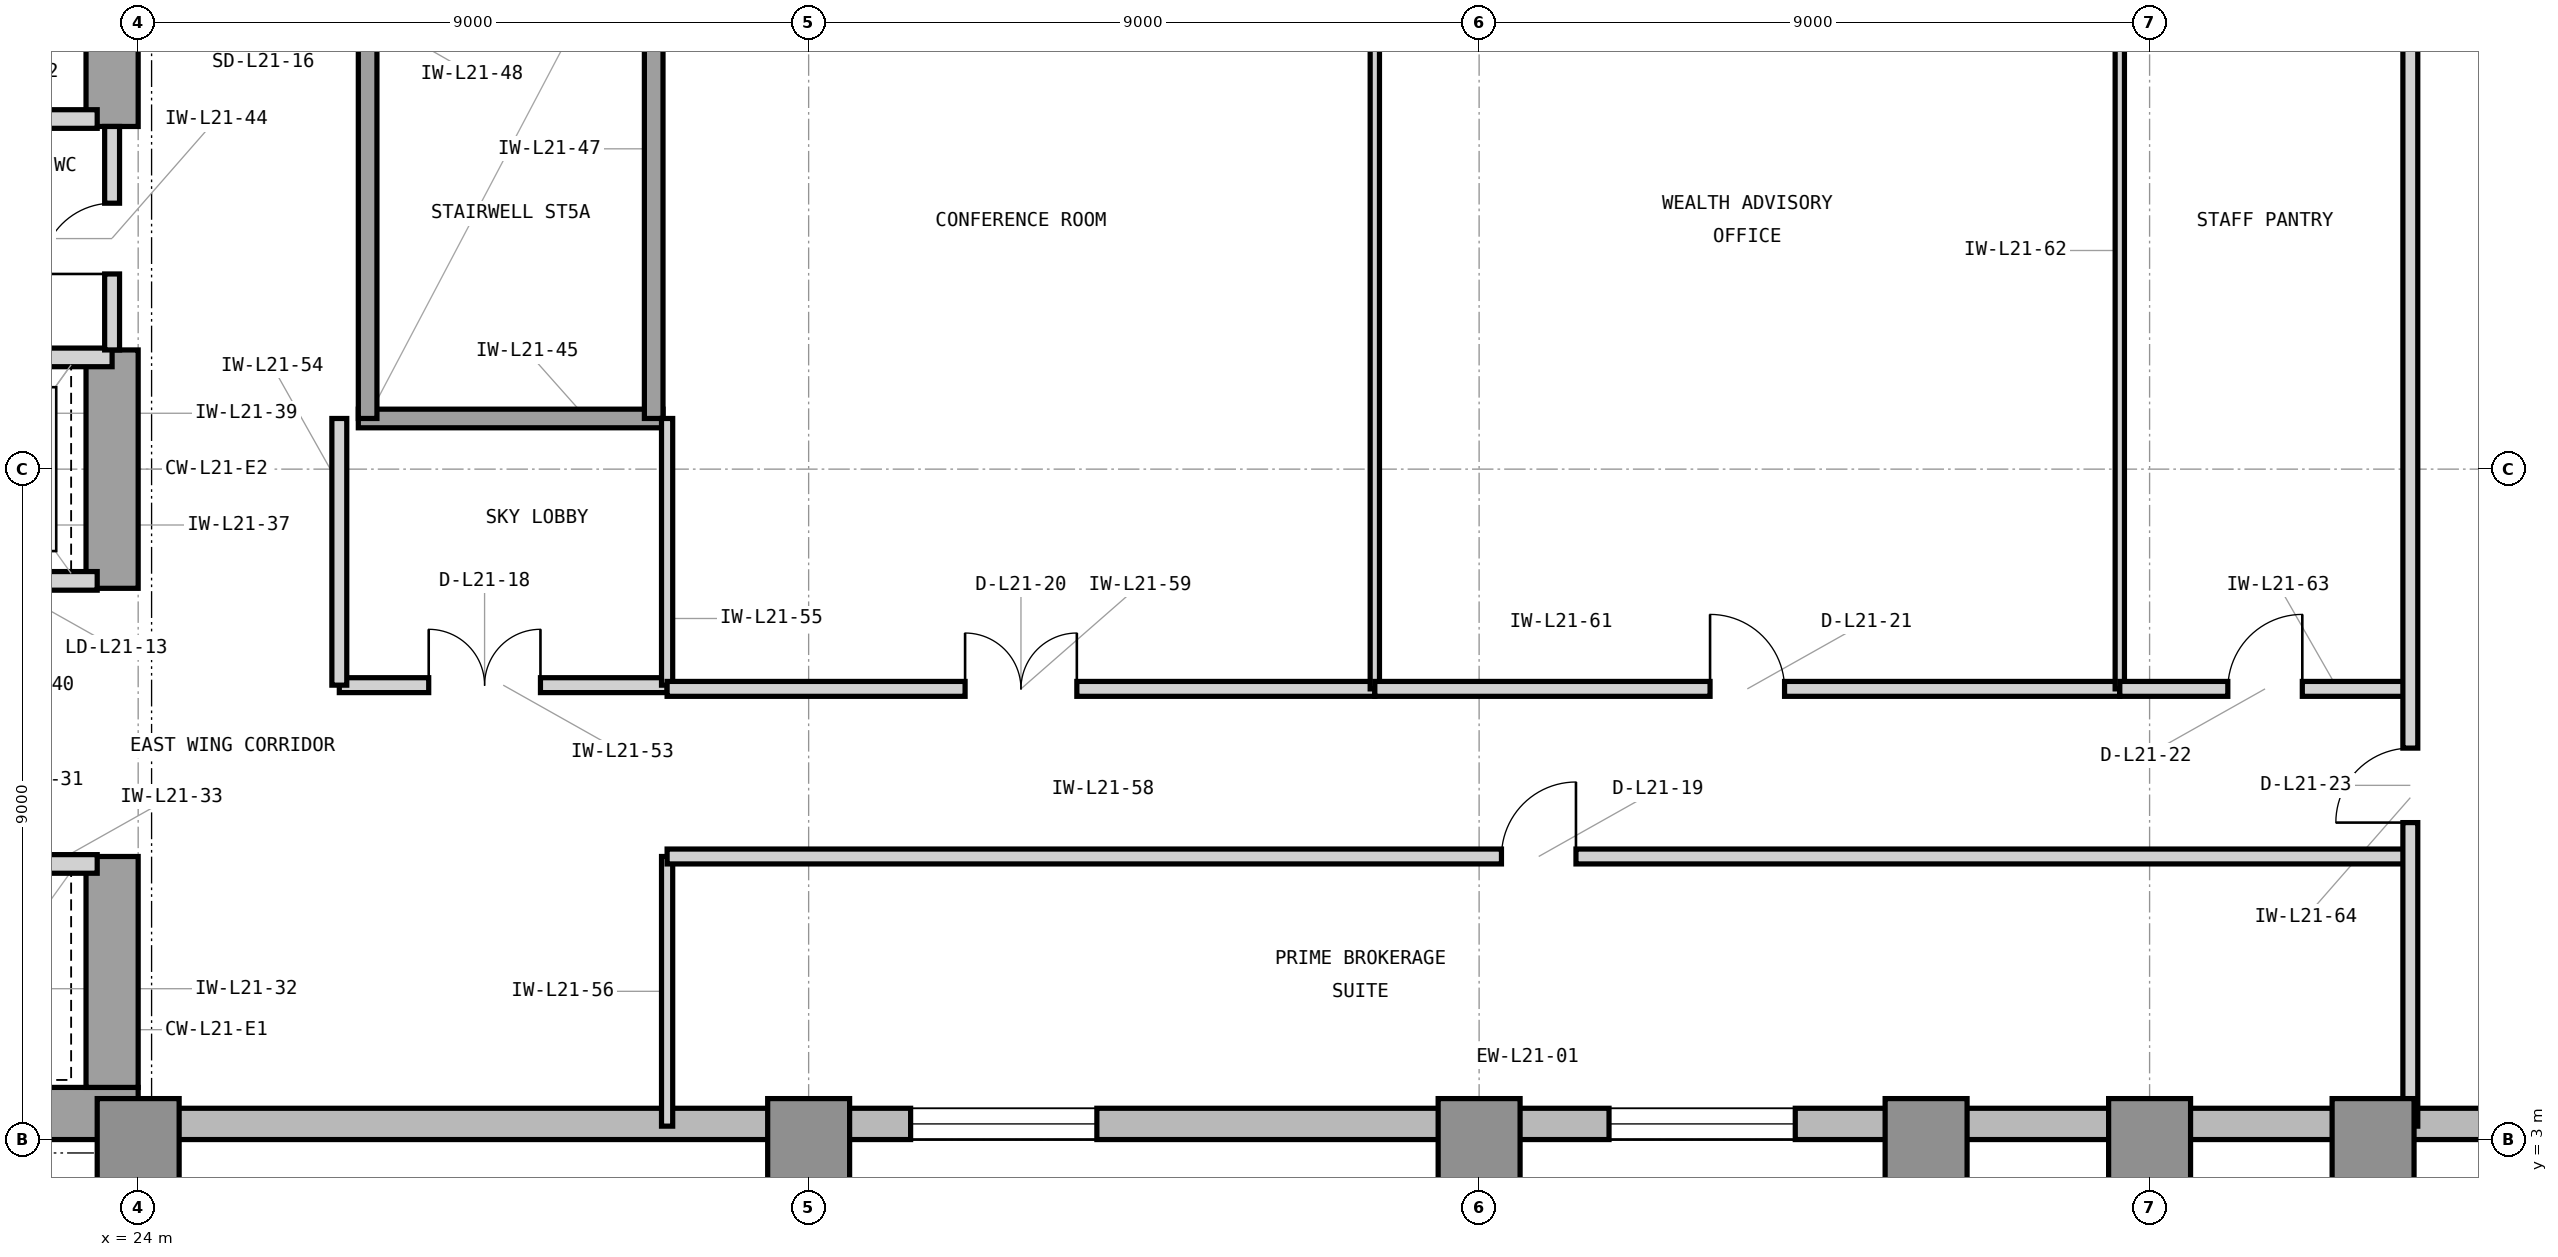
"""IFC4 building model, lengths in metres.
Left out: names, types, materials, properties, quantities, classifications, styles, units other than length and angle.
Written with IfcOpenShell. Run it as: python <this file> out.ifc"""

import sys

from ifc_helpers import new_model, si_unit, direction, frame, frame_2d, origin, origin_2d, place, context, subcontext, project, spatial, rectangle, extrude, element, fill, save


model = new_model("IFC4")
c1 = context("Model", 3, precision=1e-05, world=origin(), true_north=direction((0.0, 1.0)))
c2 = subcontext(c1, "Body", "Model", "MODEL_VIEW")
j1 = project(units=[si_unit("LENGTHUNIT", "METRE"), si_unit("PLANEANGLEUNIT", "RADIAN")], contexts=[c1])
p1 = place(None, origin())
s1 = spatial("IfcSite", under=j1, at=p1, CompositionType="ELEMENT")
p2 = place(p1, origin())
s2 = spatial("IfcBuilding", under=s1, at=p2, CompositionType="ELEMENT")
p3 = place(p2, frame((0.0, 0.0, 93.3)))
s3 = spatial("IfcBuildingStorey", under=s2, at=p3, CompositionType="ELEMENT", Elevation=93.3)
p4 = place(p3, frame((7.475, 3.35, 0.0), z_axis=(0.0, 0.0, 1.0), x_axis=(1.0, 0.0, 0.0)))
e1 = element("IfcWall", 1, at=p4, inside=s3, PredefinedType="SHEAR", context=c2, shape_type="SweptSolid", body=[
    extrude(rectangle(XDim=16.525, YDim=0.7, at=frame_2d((8.262, 0.0))), origin(), (0.0, 0.0, 1.0), 3.9),
])
p5 = place(p3, frame((23.65, 3.7, 0.0), z_axis=(0.0, 0.0, 1.0), x_axis=(0.0, 1.0, 0.0)))
e2 = element("IfcWall", 2, at=p5, inside=s3, PredefinedType="SHEAR", context=c2, shape_type="SweptSolid", body=[
    extrude(rectangle(XDim=3.1, YDim=0.7, at=frame_2d((1.55, 0.0))), origin(), (0.0, 0.0, 1.0), 3.9),
])
p6 = place(p3, frame((23.65, 10.4, 0.0), z_axis=(0.0, 0.0, 1.0), x_axis=(0.0, 1.0, 0.0)))
e3 = element("IfcWall", 3, at=p6, inside=s3, PredefinedType="SHEAR", context=c2, shape_type="SweptSolid", body=[
    extrude(rectangle(XDim=3.2, YDim=0.7, at=frame_2d((1.6, 0.0))), origin(), (0.0, 0.0, 1.0), 3.9),
])
p7 = place(p3, frame((23.65, 16.6, 0.0), z_axis=(0.0, 0.0, 1.0), x_axis=(0.0, 1.0, 0.0)))
e4 = element("IfcWall", 4, at=p7, inside=s3, PredefinedType="SHEAR", context=c2, shape_type="SweptSolid", body=[
    extrude(rectangle(XDim=4.05, YDim=0.7, at=frame_2d((2.025, 0.0))), origin(), (0.0, 0.0, 1.0), 3.9),
])
for number, where, z_axis, x_axis in (
    (5, (24.0, 3.0, 0.0), (0.0, 0.0, 1.0), (1.0, 0.0, 0.0)),
    (6, (33.0, 3.0, 0.0), (0.0, 0.0, 1.0), (1.0, 0.0, 0.0)),
    (7, (42.0, 3.0, 0.0), (0.0, 0.0, 1.0), (1.0, 0.0, 0.0)),
    (8, (48.0, 3.0, 0.0), (0.0, 0.0, 1.0), (1.0, 0.0, 0.0)),
    (9, (51.0, 3.0, 0.0), (0.0, 0.0, 1.0), (1.0, 0.0, 0.0)),
    (10, (54.0, 3.0, 0.0), (0.0, 0.0, 1.0), (1.0, 0.0, 0.0)),
):
    element("IfcColumn", number, at=place(p3, frame(where, z_axis=z_axis, x_axis=x_axis)), inside=s3, PredefinedType="COLUMN", context=c2, shape_type="SweptSolid", body=[
        extrude(rectangle(XDim=1.1, YDim=1.1, at=origin_2d()), origin(), (0.0, 0.0, 1.0), 3.9),
    ])
p8 = place(p3, frame((23.9, 3.21, 0.0), z_axis=(0.0, 0.0, 1.0), x_axis=(1.0, 0.0, 0.0)))
e11 = element("IfcWall", 11, at=p8, inside=s3, PredefinedType="STANDARD", context=c2, shape_type="SweptSolid", body=[
    extrude(rectangle(XDim=37.5, YDim=0.42, at=frame_2d((18.75, 0.0))), origin(), (0.0, 0.0, 1.0), 3.7),
])
p9 = place(p8, frame((10.469, 0.0, 0.85)))
e12 = element("IfcOpeningElement", 12, at=p9, cuts=e11, PredefinedType="OPENING", context=c2, shape_type="SweptSolid", body=[
    extrude(rectangle(XDim=2.5, YDim=2.25, at=frame_2d((1.25, 1.125))), frame((0.0, 0.22, 0.0), z_axis=(0.0, -1.0, 0.0), x_axis=(1.0, 0.0, 0.0)), (0.0, 0.0, 1.0), 0.44),
])
p10 = place(p8, frame((19.844, 0.0, 0.85)))
e13 = element("IfcOpeningElement", 13, at=p10, cuts=e11, PredefinedType="OPENING", context=c2, shape_type="SweptSolid", body=[
    extrude(rectangle(XDim=2.5, YDim=2.25, at=frame_2d((1.25, 1.125))), frame((0.0, 0.22, 0.0), z_axis=(0.0, -1.0, 0.0), x_axis=(1.0, 0.0, 0.0)), (0.0, 0.0, 1.0), 0.44),
])
for number, where, z_axis, x_axis in (
    (14, (21.05, 16.7, 0.0), (0.0, 0.0, 1.0), (1.0, 0.0, 0.0)),
    (15, (21.05, 6.7, 0.0), (0.0, 0.0, 1.0), (1.0, 0.0, 0.0)),
):
    element("IfcWall", number, at=place(p3, frame(where, z_axis=z_axis, x_axis=x_axis)), inside=s3, PredefinedType="PARTITIONING", context=c2, shape_type="SweptSolid", body=[
        extrude(rectangle(XDim=2.4, YDim=0.25, at=frame_2d((1.2, 0.0))), origin(), (0.0, 0.0, 1.0), 3.227),
    ])
p11 = place(p3, frame((21.05, 10.5, 0.0), z_axis=(0.0, 0.0, 1.0), x_axis=(1.0, 0.0, 0.0)))
e16 = element("IfcWall", 16, at=p11, inside=s3, PredefinedType="PARTITIONING", context=c2, shape_type="SweptSolid", body=[
    extrude(rectangle(XDim=2.4, YDim=0.25, at=frame_2d((1.2, 0.0))), origin(), (0.0, 0.0, 1.0), 3.227),
])
p12 = place(p11, frame((0.48, 0.0, 0.0)))
e17 = element("IfcOpeningElement", 17, at=p12, cuts=e16, PredefinedType="OPENING", context=c2, shape_type="SweptSolid", body=[
    extrude(rectangle(XDim=1.15, YDim=2.25, at=frame_2d((0.575, 1.125))), frame((0.0, 0.135, 0.0), z_axis=(0.0, -1.0, 0.0), x_axis=(1.0, 0.0, 0.0)), (0.0, 0.0, 1.0), 0.27),
])
p13 = place(p3, frame((14.7, 13.5, 0.0), z_axis=(0.0, 0.0, 1.0), x_axis=(1.0, 0.0, 0.0)))
e18 = element("IfcWall", 18, at=p13, inside=s3, PredefinedType="PARTITIONING", context=c2, shape_type="SweptSolid", body=[
    extrude(rectangle(XDim=8.95, YDim=0.25, at=frame_2d((4.475, 0.0))), origin(), (0.0, 0.0, 1.0), 3.227),
])
p14 = place(p3, frame((23.65, 13.6, 0.0), z_axis=(0.0, 0.0, 1.0), x_axis=(0.0, 1.0, 0.0)))
e19 = element("IfcWall", 19, at=p14, inside=s3, PredefinedType="PARTITIONING", context=c2, shape_type="SweptSolid", body=[
    extrude(rectangle(XDim=3.0, YDim=0.2, at=frame_2d((1.5, 0.0))), origin(), (0.0, 0.0, 1.0), 3.69),
])
p15 = place(p14, frame((1.02, 0.0, 0.0)))
e20 = element("IfcOpeningElement", 20, at=p15, cuts=e19, PredefinedType="OPENING", context=c2, shape_type="SweptSolid", body=[
    extrude(rectangle(XDim=0.95, YDim=2.1, at=frame_2d((0.475, 1.05))), frame((0.0, 0.11, 0.0), z_axis=(0.0, -1.0, 0.0), x_axis=(1.0, 0.0, 0.0)), (0.0, 0.0, 1.0), 0.22),
])
p16 = place(p3, frame((26.955, 12.68, 0.0), z_axis=(0.0, 0.0, 1.0), x_axis=(1.0, 0.0, 0.0)))
e21 = element("IfcWall", 21, at=p16, inside=s3, PredefinedType="SHEAR", context=c2, shape_type="SweptSolid", body=[
    extrude(rectangle(XDim=4.09, YDim=0.25, at=frame_2d((2.045, 0.0))), origin(), (0.0, 0.0, 1.0), 3.9),
])
p17 = place(p3, frame((30.92, 12.68, 0.0), z_axis=(0.0, 0.0, 1.0), x_axis=(0.0, 1.0, 0.0)))
e22 = element("IfcWall", 22, at=p17, inside=s3, PredefinedType="SHEAR", context=c2, shape_type="SweptSolid", body=[
    extrude(rectangle(XDim=7.24, YDim=0.25, at=frame_2d((3.62, 0.0))), origin(), (0.0, 0.0, 1.0), 3.9),
])
p18 = place(p3, frame((27.08, 12.68, 0.0), z_axis=(0.0, 0.0, 1.0), x_axis=(0.0, 1.0, 0.0)))
e23 = element("IfcWall", 23, at=p18, inside=s3, PredefinedType="SHEAR", context=c2, shape_type="SweptSolid", body=[
    extrude(rectangle(XDim=7.24, YDim=0.25, at=frame_2d((3.62, 0.0))), origin(), (0.0, 0.0, 1.0), 3.9),
])
p19 = place(p18, frame((5.76, 0.0, 0.0)))
e24 = element("IfcOpeningElement", 24, at=p19, cuts=e23, PredefinedType="OPENING", context=c2, shape_type="SweptSolid", body=[
    extrude(rectangle(XDim=1.25, YDim=2.2, at=frame_2d((0.625, 1.1))), frame((0.0, 0.135, 0.0), z_axis=(0.0, -1.0, 0.0), x_axis=(1.0, 0.0, 0.0)), (0.0, 0.0, 1.0), 0.27),
])
p20 = place(p3, frame((26.7, 9.1, 0.0), z_axis=(0.0, 0.0, 1.0), x_axis=(1.0, 0.0, 0.0)))
e25 = element("IfcWall", 25, at=p20, inside=s3, PredefinedType="PARTITIONING", context=c2, shape_type="SweptSolid", body=[
    extrude(rectangle(XDim=4.4, YDim=0.2, at=frame_2d((2.2, 0.0))), origin(), (0.0, 0.0, 1.0), 3.69),
])
p21 = place(p20, frame((1.2, 0.0, 0.0)))
e26 = element("IfcOpeningElement", 26, at=p21, cuts=e25, PredefinedType="OPENING", context=c2, shape_type="SweptSolid", body=[
    extrude(rectangle(XDim=1.5, YDim=2.3, at=frame_2d((0.75, 1.15))), frame((0.0, 0.11, 0.0), z_axis=(0.0, -1.0, 0.0), x_axis=(1.0, 0.0, 0.0)), (0.0, 0.0, 1.0), 0.22),
])
p22 = place(p3, frame((26.7, 9.1, 0.0), z_axis=(0.0, 0.0, 1.0), x_axis=(0.0, 1.0, 0.0)))
e27 = element("IfcWall", 27, at=p22, inside=s3, PredefinedType="PARTITIONING", context=c2, shape_type="SweptSolid", body=[
    extrude(rectangle(XDim=3.58, YDim=0.2, at=frame_2d((1.79, 0.0))), origin(), (0.0, 0.0, 1.0), 3.69),
])
p23 = place(p3, frame((31.1, 9.1, 0.0), z_axis=(0.0, 0.0, 1.0), x_axis=(0.0, 1.0, 0.0)))
e28 = element("IfcWall", 28, at=p23, inside=s3, PredefinedType="PARTITIONING", context=c2, shape_type="SweptSolid", body=[
    extrude(rectangle(XDim=3.58, YDim=0.15, at=frame_2d((1.79, 0.0))), origin(), (0.0, 0.0, 1.0), 3.69),
])
p24 = place(p3, frame((31.1, 3.18, 0.0), z_axis=(0.0, 0.0, 1.0), x_axis=(0.0, 1.0, 0.0)))
e29 = element("IfcWall", 29, at=p24, inside=s3, PredefinedType="PARTITIONING", context=c2, shape_type="SweptSolid", body=[
    extrude(rectangle(XDim=3.62, YDim=0.15, at=frame_2d((1.81, 0.0))), origin(), (0.0, 0.0, 1.0), 3.69),
])
p25 = place(p3, frame((31.1, 6.8, 0.0), z_axis=(0.0, 0.0, 1.0), x_axis=(1.0, 0.0, 0.0)))
e30 = element("IfcWall", 30, at=p25, inside=s3, PredefinedType="PARTITIONING", context=c2, shape_type="SweptSolid", body=[
    extrude(rectangle(XDim=23.4, YDim=0.2, at=frame_2d((11.7, 0.0))), origin(), (0.0, 0.0, 1.0), 3.69),
])
p26 = place(p25, frame((11.2, 0.0, 0.0)))
e31 = element("IfcOpeningElement", 31, at=p26, cuts=e30, PredefinedType="OPENING", context=c2, shape_type="SweptSolid", body=[
    extrude(rectangle(XDim=1.0, YDim=2.15, at=frame_2d((0.5, 1.075))), frame((0.0, 0.11, 0.0), z_axis=(0.0, -1.0, 0.0), x_axis=(1.0, 0.0, 0.0)), (0.0, 0.0, 1.0), 0.22),
])
p27 = place(p3, frame((31.1, 9.05, 0.0), z_axis=(0.0, 0.0, 1.0), x_axis=(1.0, 0.0, 0.0)))
e32 = element("IfcWall", 32, at=p27, inside=s3, PredefinedType="PARTITIONING", context=c2, shape_type="SweptSolid", body=[
    extrude(rectangle(XDim=9.5, YDim=0.2, at=frame_2d((4.75, 0.0))), origin(), (0.0, 0.0, 1.0), 3.227),
])
p28 = place(p27, frame((4.0, 0.0, 0.0)))
e33 = element("IfcOpeningElement", 33, at=p28, cuts=e32, PredefinedType="OPENING", context=c2, shape_type="SweptSolid", body=[
    extrude(rectangle(XDim=1.5, YDim=2.3, at=frame_2d((0.75, 1.15))), frame((0.0, 0.11, 0.0), z_axis=(0.0, -1.0, 0.0), x_axis=(1.0, 0.0, 0.0)), (0.0, 0.0, 1.0), 0.22),
])
p29 = place(p3, frame((40.6, 9.05, 0.0), z_axis=(0.0, 0.0, 1.0), x_axis=(0.0, 1.0, 0.0)))
e34 = element("IfcWall", 34, at=p29, inside=s3, PredefinedType="PARTITIONING", context=c2, shape_type="SweptSolid", body=[
    extrude(rectangle(XDim=11.77, YDim=0.125, at=frame_2d((5.885, 0.0))), origin(), (0.0, 0.0, 1.0), 3.69),
])
p30 = place(p3, frame((40.6, 9.05, 0.0), z_axis=(0.0, 0.0, 1.0), x_axis=(1.0, 0.0, 0.0)))
e35 = element("IfcWall", 35, at=p30, inside=s3, PredefinedType="PARTITIONING", context=c2, shape_type="SweptSolid", body=[
    extrude(rectangle(XDim=10.0, YDim=0.2, at=frame_2d((5.0, 0.0))), origin(), (0.0, 0.0, 1.0), 3.227),
])
p31 = place(p30, frame((4.5, 0.0, 0.0)))
e36 = element("IfcOpeningElement", 36, at=p31, cuts=e35, PredefinedType="OPENING", context=c2, shape_type="SweptSolid", body=[
    extrude(rectangle(XDim=1.0, YDim=2.15, at=frame_2d((0.5, 1.075))), frame((0.0, 0.11, 0.0), z_axis=(0.0, -1.0, 0.0), x_axis=(1.0, 0.0, 0.0)), (0.0, 0.0, 1.0), 0.22),
])
p32 = place(p3, frame((50.6, 9.05, 0.0), z_axis=(0.0, 0.0, 1.0), x_axis=(0.0, 1.0, 0.0)))
e37 = element("IfcWall", 37, at=p32, inside=s3, PredefinedType="PARTITIONING", context=c2, shape_type="SweptSolid", body=[
    extrude(rectangle(XDim=11.77, YDim=0.125, at=frame_2d((5.885, 0.0))), origin(), (0.0, 0.0, 1.0), 3.69),
])
p33 = place(p3, frame((50.6, 9.05, 0.0), z_axis=(0.0, 0.0, 1.0), x_axis=(1.0, 0.0, 0.0)))
e38 = element("IfcWall", 38, at=p33, inside=s3, PredefinedType="PARTITIONING", context=c2, shape_type="SweptSolid", body=[
    extrude(rectangle(XDim=3.9, YDim=0.2, at=frame_2d((1.95, 0.0))), origin(), (0.0, 0.0, 1.0), 3.227),
])
p34 = place(p33, frame((1.45, 0.0, 0.0)))
e39 = element("IfcOpeningElement", 39, at=p34, cuts=e38, PredefinedType="OPENING", context=c2, shape_type="SweptSolid", body=[
    extrude(rectangle(XDim=1.0, YDim=2.15, at=frame_2d((0.5, 1.075))), frame((0.0, 0.11, 0.0), z_axis=(0.0, -1.0, 0.0), x_axis=(1.0, 0.0, 0.0)), (0.0, 0.0, 1.0), 0.22),
])
p35 = place(p3, frame((54.5, 3.18, 0.0), z_axis=(0.0, 0.0, 1.0), x_axis=(0.0, 1.0, 0.0)))
e40 = element("IfcWall", 40, at=p35, inside=s3, PredefinedType="PARTITIONING", context=c2, shape_type="SweptSolid", body=[
    extrude(rectangle(XDim=17.64, YDim=0.2, at=frame_2d((8.82, 0.0))), origin(), (0.0, 0.0, 1.0), 3.69),
])
p36 = place(p35, frame((4.075, 0.0, 0.0)))
e41 = element("IfcOpeningElement", 41, at=p36, cuts=e40, PredefinedType="OPENING", context=c2, shape_type="SweptSolid", body=[
    extrude(rectangle(XDim=1.0, YDim=2.15, at=frame_2d((0.5, 1.075))), frame((0.0, 0.11, 0.0), z_axis=(0.0, -1.0, 0.0), x_axis=(1.0, 0.0, 0.0)), (0.0, 0.0, 1.0), 0.22),
])
p37 = place(p9, origin())
e42 = element("IfcWindow", 42, at=p37, inside=s3, PartitioningType="SINGLE_PANEL", PredefinedType="WINDOW", context=c2, shape_type="SweptSolid", body=[
    extrude(rectangle(XDim=2.5, YDim=2.25, at=frame_2d((1.25, 1.125))), frame((0.0, 0.11, 0.0), z_axis=(0.0, -1.0, 0.0), x_axis=(1.0, 0.0, 0.0)), (0.0, 0.0, 1.0), 0.06),
])
fill(e12, e42)
p38 = place(p10, origin())
e43 = element("IfcWindow", 43, at=p38, inside=s3, PartitioningType="SINGLE_PANEL", PredefinedType="WINDOW", context=c2, shape_type="SweptSolid", body=[
    extrude(rectangle(XDim=2.5, YDim=2.25, at=frame_2d((1.25, 1.125))), frame((0.0, 0.11, 0.0), z_axis=(0.0, -1.0, 0.0), x_axis=(1.0, 0.0, 0.0)), (0.0, 0.0, 1.0), 0.06),
])
fill(e13, e43)
p39 = place(p15, origin())
e44 = element("IfcDoor", 44, at=p39, inside=s3, OperationType="SINGLE_SWING_LEFT", PredefinedType="DOOR", context=c2, shape_type="SweptSolid", body=[
    extrude(rectangle(XDim=0.95, YDim=2.1, at=frame_2d((0.475, 1.05))), frame((0.0, 0.025, 0.0), z_axis=(0.0, -1.0, 0.0), x_axis=(1.0, 0.0, 0.0)), (0.0, 0.0, 1.0), 0.05),
])
fill(e20, e44)
p40 = place(p21, origin())
e45 = element("IfcDoor", 45, at=p40, inside=s3, OperationType="DOUBLE_DOOR_SINGLE_SWING", PredefinedType="DOOR", context=c2, shape_type="SweptSolid", body=[
    extrude(rectangle(XDim=1.5, YDim=2.3, at=frame_2d((0.75, 1.15))), frame((0.0, 0.025, 0.0), z_axis=(0.0, -1.0, 0.0), x_axis=(1.0, 0.0, 0.0)), (0.0, 0.0, 1.0), 0.05),
])
fill(e26, e45)
p41 = place(p26, origin())
e46 = element("IfcDoor", 46, at=p41, inside=s3, OperationType="SINGLE_SWING_RIGHT", PredefinedType="DOOR", context=c2, shape_type="SweptSolid", body=[
    extrude(rectangle(XDim=1.0, YDim=2.15, at=frame_2d((0.5, 1.075))), frame((0.0, 0.025, 0.0), z_axis=(0.0, -1.0, 0.0), x_axis=(1.0, 0.0, 0.0)), (0.0, 0.0, 1.0), 0.05),
])
fill(e31, e46)
p42 = place(p28, origin())
e47 = element("IfcDoor", 47, at=p42, inside=s3, OperationType="DOUBLE_DOOR_SINGLE_SWING", PredefinedType="DOOR", context=c2, shape_type="SweptSolid", body=[
    extrude(rectangle(XDim=1.5, YDim=2.3, at=frame_2d((0.75, 1.15))), frame((0.0, 0.025, 0.0), z_axis=(0.0, -1.0, 0.0), x_axis=(1.0, 0.0, 0.0)), (0.0, 0.0, 1.0), 0.05),
])
fill(e33, e47)
p43 = place(p31, origin())
e48 = element("IfcDoor", 48, at=p43, inside=s3, OperationType="SINGLE_SWING_LEFT", PredefinedType="DOOR", context=c2, shape_type="SweptSolid", body=[
    extrude(rectangle(XDim=1.0, YDim=2.15, at=frame_2d((0.5, 1.075))), frame((0.0, 0.025, 0.0), z_axis=(0.0, -1.0, 0.0), x_axis=(1.0, 0.0, 0.0)), (0.0, 0.0, 1.0), 0.05),
])
fill(e36, e48)
p44 = place(p34, origin())
e49 = element("IfcDoor", 49, at=p44, inside=s3, OperationType="SINGLE_SWING_RIGHT", PredefinedType="DOOR", context=c2, shape_type="SweptSolid", body=[
    extrude(rectangle(XDim=1.0, YDim=2.15, at=frame_2d((0.5, 1.075))), frame((0.0, 0.025, 0.0), z_axis=(0.0, -1.0, 0.0), x_axis=(1.0, 0.0, 0.0)), (0.0, 0.0, 1.0), 0.05),
])
fill(e39, e49)
p45 = place(p36, origin())
e50 = element("IfcDoor", 50, at=p45, inside=s3, OperationType="SINGLE_SWING_LEFT", PredefinedType="DOOR", context=c2, shape_type="SweptSolid", body=[
    extrude(rectangle(XDim=1.0, YDim=2.15, at=frame_2d((0.5, 1.075))), frame((0.0, 0.025, 0.0), z_axis=(0.0, -1.0, 0.0), x_axis=(1.0, 0.0, 0.0)), (0.0, 0.0, 1.0), 0.05),
])
fill(e41, e50)
save(model, sys.argv[1])
